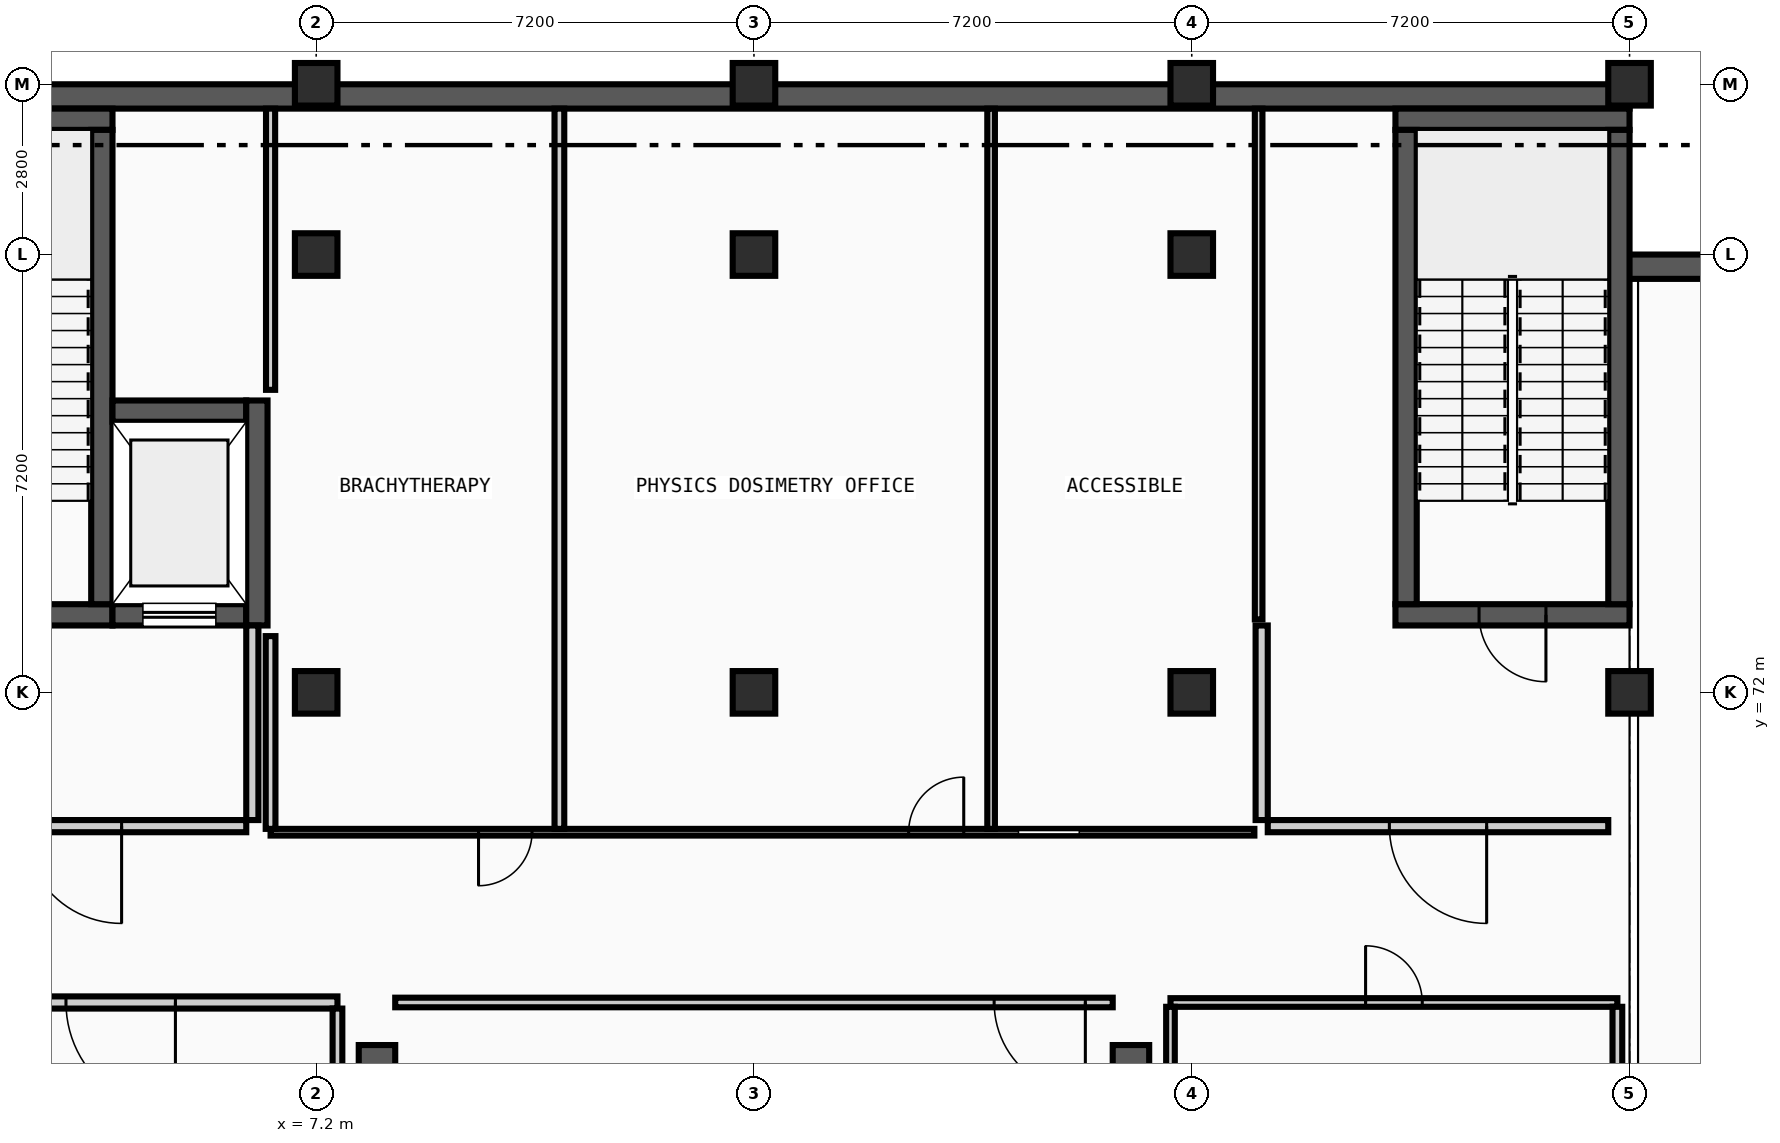
"""IFC4 building model, lengths in metres.
Left out: names, types, materials, properties, quantities, classifications, styles, units other than length and angle.
Written with IfcOpenShell. Run it as: python <this file> out.ifc"""

import sys

from ifc_helpers import new_model, si_unit, direction, frame, frame_2d, origin, origin_2d, place, context, subcontext, project, spatial, rectangle, extrude, element, fill, save


model = new_model("IFC4")
c1 = context("Model", 3, precision=1e-05, world=origin(), true_north=direction((0.0, 1.0)))
c2 = subcontext(c1, "Body", "Model", "MODEL_VIEW")
j1 = project(units=[si_unit("LENGTHUNIT", "METRE"), si_unit("PLANEANGLEUNIT", "RADIAN")], contexts=[c1])
p1 = place(None, origin())
s1 = spatial("IfcSite", under=j1, at=p1, CompositionType="ELEMENT")
p2 = place(p1, origin())
s2 = spatial("IfcBuilding", under=s1, at=p2, CompositionType="ELEMENT")
p3 = place(p2, frame((0.0, 0.0, -4.8)))
s3 = spatial("IfcBuildingStorey", under=s2, at=p3, CompositionType="ELEMENT", Elevation=-4.8)
for number, where, z_axis, x_axis in (
    (1, (7.2, 72.0, 0.0), (0.0, 0.0, 1.0), (1.0, 0.0, 0.0)),
    (2, (7.2, 79.2, 0.0), (0.0, 0.0, 1.0), (1.0, 0.0, 0.0)),
    (3, (7.2, 82.0, 0.0), (0.0, 0.0, 1.0), (1.0, 0.0, 0.0)),
    (4, (14.4, 72.0, 0.0), (0.0, 0.0, 1.0), (1.0, 0.0, 0.0)),
    (5, (14.4, 79.2, 0.0), (0.0, 0.0, 1.0), (1.0, 0.0, 0.0)),
    (6, (14.4, 82.0, 0.0), (0.0, 0.0, 1.0), (1.0, 0.0, 0.0)),
    (7, (21.6, 72.0, 0.0), (0.0, 0.0, 1.0), (1.0, 0.0, 0.0)),
    (8, (21.6, 79.2, 0.0), (0.0, 0.0, 1.0), (1.0, 0.0, 0.0)),
    (9, (21.6, 82.0, 0.0), (0.0, 0.0, 1.0), (1.0, 0.0, 0.0)),
    (10, (28.8, 72.0, 0.0), (0.0, 0.0, 1.0), (1.0, 0.0, 0.0)),
    (11, (28.8, 82.0, 0.0), (0.0, 0.0, 1.0), (1.0, 0.0, 0.0)),
):
    element("IfcColumn", number, at=place(p3, frame(where, z_axis=z_axis, x_axis=x_axis)), inside=s3, PredefinedType="COLUMN", context=c2, shape_type="SweptSolid", body=[
        extrude(rectangle(XDim=0.7, YDim=0.7, at=origin_2d()), origin(), (0.0, 0.0, 1.0), 4.8),
    ])
p4 = place(p3, frame((36.4, 79.0, 0.0), z_axis=(0.0, 0.0, 1.0), x_axis=(-1.0, 0.0, 0.0)))
e12 = element("IfcWall", 12, at=p4, inside=s3, PredefinedType="USERDEFINED", context=c2, shape_type="SweptSolid", body=[
    extrude(rectangle(XDim=8.0, YDim=0.4, at=frame_2d((4.0, 0.0))), origin(), (0.0, 0.0, 1.0), 4.545),
])
p5 = place(p3, frame((28.8, 81.8, 0.0), z_axis=(0.0, 0.0, 1.0), x_axis=(-1.0, 0.0, 0.0)))
e13 = element("IfcWall", 13, at=p5, inside=s3, PredefinedType="USERDEFINED", context=c2, shape_type="SweptSolid", body=[
    extrude(rectangle(XDim=28.8, YDim=0.4, at=frame_2d((14.4, 0.0))), origin(), (0.0, 0.0, 1.0), 4.545),
])
for number, where, z_axis, x_axis in (
    (14, (8.2, 58.6, 0.0), (0.0, 0.0, 1.0), (0.0, 1.0, 0.0)),
    (15, (20.6, 58.6, 0.0), (0.0, 0.0, 1.0), (0.0, 1.0, 0.0)),
):
    element("IfcWall", number, at=place(p3, frame(where, z_axis=z_axis, x_axis=x_axis)), inside=s3, PredefinedType="SHEAR", context=c2, shape_type="SweptSolid", body=[
        extrude(rectangle(XDim=7.6, YDim=0.6, at=frame_2d((3.8, 0.0))), origin(), (0.0, 0.0, 1.0), 4.5),
    ])
p6 = place(p3, frame((0.0, 73.275, 0.0), z_axis=(0.0, 0.0, 1.0), x_axis=(1.0, 0.0, 0.0)))
e16 = element("IfcWall", 16, at=p6, inside=s3, PredefinedType="SHEAR", context=c2, shape_type="SweptSolid", body=[
    extrude(rectangle(XDim=3.85, YDim=0.35, at=frame_2d((1.925, 0.0))), origin(), (0.0, 0.0, 1.0), 4.545),
])
p7 = place(p6, frame((1.375, 0.0, 0.0)))
e17 = element("IfcOpeningElement", 17, at=p7, cuts=e16, PredefinedType="OPENING", context=c2, shape_type="SweptSolid", body=[
    extrude(rectangle(XDim=1.1, YDim=2.15, at=frame_2d((0.55, 1.075))), frame((0.0, 0.185, 0.0), z_axis=(0.0, -1.0, 0.0), x_axis=(1.0, 0.0, 0.0)), (0.0, 0.0, 1.0), 0.37),
])
p8 = place(p3, frame((0.0, 81.425, 0.0), z_axis=(0.0, 0.0, 1.0), x_axis=(1.0, 0.0, 0.0)))
e18 = element("IfcWall", 18, at=p8, inside=s3, PredefinedType="SHEAR", context=c2, shape_type="SweptSolid", body=[
    extrude(rectangle(XDim=3.85, YDim=0.35, at=frame_2d((1.925, 0.0))), origin(), (0.0, 0.0, 1.0), 4.545),
])
p9 = place(p3, frame((3.675, 73.45, 0.0), z_axis=(0.0, 0.0, 1.0), x_axis=(0.0, 1.0, 0.0)))
e19 = element("IfcWall", 19, at=p9, inside=s3, PredefinedType="SHEAR", context=c2, shape_type="SweptSolid", body=[
    extrude(rectangle(XDim=7.8, YDim=0.35, at=frame_2d((3.9, 0.0))), origin(), (0.0, 0.0, 1.0), 4.545),
])
p10 = place(p3, frame((3.85, 73.275, 0.0), z_axis=(0.0, 0.0, 1.0), x_axis=(1.0, 0.0, 0.0)))
e20 = element("IfcWall", 20, at=p10, inside=s3, PredefinedType="SHEAR", context=c2, shape_type="SweptSolid", body=[
    extrude(rectangle(XDim=2.2, YDim=0.35, at=frame_2d((1.1, 0.0))), origin(), (0.0, 0.0, 1.0), 4.545),
])
p11 = place(p10, frame((0.5, 0.0, 0.0)))
e21 = element("IfcOpeningElement", 21, at=p11, cuts=e20, PredefinedType="OPENING", context=c2, shape_type="SweptSolid", body=[
    extrude(rectangle(XDim=1.2, YDim=2.2, at=frame_2d((0.6, 1.1))), frame((0.0, 0.185, 0.0), z_axis=(0.0, -1.0, 0.0), x_axis=(1.0, 0.0, 0.0)), (0.0, 0.0, 1.0), 0.37),
])
p12 = place(p3, frame((3.85, 76.625, 0.0), z_axis=(0.0, 0.0, 1.0), x_axis=(1.0, 0.0, 0.0)))
e22 = element("IfcWall", 22, at=p12, inside=s3, PredefinedType="SHEAR", context=c2, shape_type="SweptSolid", body=[
    extrude(rectangle(XDim=2.2, YDim=0.35, at=frame_2d((1.1, 0.0))), origin(), (0.0, 0.0, 1.0), 4.545),
])
p13 = place(p3, frame((6.225, 73.1, 0.0), z_axis=(0.0, 0.0, 1.0), x_axis=(0.0, 1.0, 0.0)))
e23 = element("IfcWall", 23, at=p13, inside=s3, PredefinedType="SHEAR", context=c2, shape_type="SweptSolid", body=[
    extrude(rectangle(XDim=3.7, YDim=0.35, at=frame_2d((1.85, 0.0))), origin(), (0.0, 0.0, 1.0), 4.545),
])
p14 = place(p3, frame((0.35, 69.8, 0.0), z_axis=(0.0, 0.0, 1.0), x_axis=(1.0, 0.0, 0.0)))
e24 = element("IfcWall", 24, at=p14, inside=s3, PredefinedType="PARTITIONING", context=c2, shape_type="SweptSolid", body=[
    extrude(rectangle(XDim=5.7, YDim=0.2, at=frame_2d((2.85, 0.0))), origin(), (0.0, 0.0, 1.0), 4.545),
])
p15 = place(p14, frame((2.05, 0.0, 0.0)))
e25 = element("IfcOpeningElement", 25, at=p15, cuts=e24, PredefinedType="OPENING", context=c2, shape_type="SweptSolid", body=[
    extrude(rectangle(XDim=1.6, YDim=2.2, at=frame_2d((0.8, 1.1))), frame((0.0, 0.11, 0.0), z_axis=(0.0, -1.0, 0.0), x_axis=(1.0, 0.0, 0.0)), (0.0, 0.0, 1.0), 0.22),
])
p16 = place(p3, frame((6.15, 69.9, 0.0), z_axis=(0.0, 0.0, 1.0), x_axis=(0.0, 1.0, 0.0)))
e26 = element("IfcWall", 26, at=p16, inside=s3, PredefinedType="PARTITIONING", context=c2, shape_type="SweptSolid", body=[
    extrude(rectangle(XDim=3.2, YDim=0.2, at=frame_2d((1.6, 0.0))), origin(), (0.0, 0.0, 1.0), 4.545),
])
p17 = place(p3, frame((24.95, 73.275, 0.0), z_axis=(0.0, 0.0, 1.0), x_axis=(1.0, 0.0, 0.0)))
e27 = element("IfcWall", 27, at=p17, inside=s3, PredefinedType="SHEAR", context=c2, shape_type="SweptSolid", body=[
    extrude(rectangle(XDim=3.85, YDim=0.35, at=frame_2d((1.925, 0.0))), origin(), (0.0, 0.0, 1.0), 4.545),
])
p18 = place(p17, frame((1.375, 0.0, 0.0)))
e28 = element("IfcOpeningElement", 28, at=p18, cuts=e27, PredefinedType="OPENING", context=c2, shape_type="SweptSolid", body=[
    extrude(rectangle(XDim=1.1, YDim=2.15, at=frame_2d((0.55, 1.075))), frame((0.0, 0.185, 0.0), z_axis=(0.0, -1.0, 0.0), x_axis=(1.0, 0.0, 0.0)), (0.0, 0.0, 1.0), 0.37),
])
p19 = place(p3, frame((24.95, 81.425, 0.0), z_axis=(0.0, 0.0, 1.0), x_axis=(1.0, 0.0, 0.0)))
e29 = element("IfcWall", 29, at=p19, inside=s3, PredefinedType="SHEAR", context=c2, shape_type="SweptSolid", body=[
    extrude(rectangle(XDim=3.85, YDim=0.35, at=frame_2d((1.925, 0.0))), origin(), (0.0, 0.0, 1.0), 4.545),
])
for number, where, z_axis, x_axis in (
    (30, (25.125, 73.45, 0.0), (0.0, 0.0, 1.0), (0.0, 1.0, 0.0)),
    (31, (28.625, 73.45, 0.0), (0.0, 0.0, 1.0), (0.0, 1.0, 0.0)),
):
    element("IfcWall", number, at=place(p3, frame(where, z_axis=z_axis, x_axis=x_axis)), inside=s3, PredefinedType="SHEAR", context=c2, shape_type="SweptSolid", body=[
        extrude(rectangle(XDim=7.8, YDim=0.35, at=frame_2d((3.9, 0.0))), origin(), (0.0, 0.0, 1.0), 4.545),
    ])
p20 = place(p3, frame((22.85, 69.8, 0.0), z_axis=(0.0, 0.0, 1.0), x_axis=(1.0, 0.0, 0.0)))
e32 = element("IfcWall", 32, at=p20, inside=s3, PredefinedType="PARTITIONING", context=c2, shape_type="SweptSolid", body=[
    extrude(rectangle(XDim=5.6, YDim=0.2, at=frame_2d((2.8, 0.0))), origin(), (0.0, 0.0, 1.0), 4.545),
])
p21 = place(p20, frame((2.0, 0.0, 0.0)))
e33 = element("IfcOpeningElement", 33, at=p21, cuts=e32, PredefinedType="OPENING", context=c2, shape_type="SweptSolid", body=[
    extrude(rectangle(XDim=1.6, YDim=2.2, at=frame_2d((0.8, 1.1))), frame((0.0, 0.11, 0.0), z_axis=(0.0, -1.0, 0.0), x_axis=(1.0, 0.0, 0.0)), (0.0, 0.0, 1.0), 0.22),
])
p22 = place(p3, frame((22.75, 69.9, 0.0), z_axis=(0.0, 0.0, 1.0), x_axis=(0.0, 1.0, 0.0)))
e34 = element("IfcWall", 34, at=p22, inside=s3, PredefinedType="PARTITIONING", context=c2, shape_type="SweptSolid", body=[
    extrude(rectangle(XDim=3.2, YDim=0.2, at=frame_2d((1.6, 0.0))), origin(), (0.0, 0.0, 1.0), 4.545),
])
p23 = place(p3, frame((0.42, 66.9, 0.0), z_axis=(0.0, 0.0, 1.0), x_axis=(1.0, 0.0, 0.0)))
e35 = element("IfcWall", 35, at=p23, inside=s3, PredefinedType="PARTITIONING", context=c2, shape_type="SweptSolid", body=[
    extrude(rectangle(XDim=7.13, YDim=0.2, at=frame_2d((3.565, 0.0))), origin(), (0.0, 0.0, 1.0), 4.545),
])
p24 = place(p23, frame((2.665, 0.0, 0.0)))
e36 = element("IfcOpeningElement", 36, at=p24, cuts=e35, PredefinedType="OPENING", context=c2, shape_type="SweptSolid", body=[
    extrude(rectangle(XDim=1.8, YDim=2.3, at=frame_2d((0.9, 1.15))), frame((0.0, 0.11, 0.0), z_axis=(0.0, -1.0, 0.0), x_axis=(1.0, 0.0, 0.0)), (0.0, 0.0, 1.0), 0.22),
])
p25 = place(p3, frame((8.5, 66.9, 0.0), z_axis=(0.0, 0.0, 1.0), x_axis=(1.0, 0.0, 0.0)))
e37 = element("IfcWall", 37, at=p25, inside=s3, PredefinedType="PARTITIONING", context=c2, shape_type="SweptSolid", body=[
    extrude(rectangle(XDim=11.8, YDim=0.158, at=frame_2d((5.9, 0.0))), origin(), (0.0, 0.0, 1.0), 4.545),
])
p26 = place(p25, frame((9.85, 0.0, 0.0)))
e38 = element("IfcOpeningElement", 38, at=p26, cuts=e37, PredefinedType="OPENING", context=c2, shape_type="SweptSolid", body=[
    extrude(rectangle(XDim=1.5, YDim=2.2, at=frame_2d((0.75, 1.1))), frame((0.0, 0.089, 0.0), z_axis=(0.0, -1.0, 0.0), x_axis=(1.0, 0.0, 0.0)), (0.0, 0.0, 1.0), 0.178),
])
p27 = place(p3, frame((21.25, 66.9, 0.0), z_axis=(0.0, 0.0, 1.0), x_axis=(1.0, 0.0, 0.0)))
e39 = element("IfcWall", 39, at=p27, inside=s3, PredefinedType="PARTITIONING", context=c2, shape_type="SweptSolid", body=[
    extrude(rectangle(XDim=7.35, YDim=0.142, at=frame_2d((3.675, 0.0))), origin(), (0.0, 0.0, 1.0), 4.545),
])
p28 = place(p27, frame((3.209, 0.0, 0.0)))
e40 = element("IfcOpeningElement", 40, at=p28, cuts=e39, PredefinedType="OPENING", context=c2, shape_type="SweptSolid", body=[
    extrude(rectangle(XDim=0.932, YDim=2.068, at=frame_2d((0.466, 1.034))), frame((0.0, 0.081, 0.0), z_axis=(0.0, -1.0, 0.0), x_axis=(1.0, 0.0, 0.0)), (0.0, 0.0, 1.0), 0.162),
])
p29 = place(p3, frame((6.45, 69.7, 0.0), z_axis=(0.0, 0.0, 1.0), x_axis=(1.0, 0.0, 0.0)))
e41 = element("IfcWall", 41, at=p29, inside=s3, PredefinedType="PARTITIONING", context=c2, shape_type="SweptSolid", body=[
    extrude(rectangle(XDim=16.18, YDim=0.11, at=frame_2d((8.09, 0.0))), origin(), (0.0, 0.0, 1.0), 4.545),
])
p30 = place(p29, frame((12.3, 0.0, 0.0)))
e42 = element("IfcOpeningElement", 42, at=p30, cuts=e41, PredefinedType="OPENING", context=c2, shape_type="SweptSolid", body=[
    extrude(rectangle(XDim=1.0, YDim=2.1, at=frame_2d((0.5, 1.05))), frame((0.0, 0.065, 0.0), z_axis=(0.0, -1.0, 0.0), x_axis=(1.0, 0.0, 0.0)), (0.0, 0.0, 1.0), 0.13),
])
p31 = place(p29, frame((3.42, 0.0, 0.0)))
e43 = element("IfcOpeningElement", 43, at=p31, cuts=e41, PredefinedType="OPENING", context=c2, shape_type="SweptSolid", body=[
    extrude(rectangle(XDim=0.88, YDim=2.068, at=frame_2d((0.44, 1.034))), frame((0.0, 0.065, 0.0), z_axis=(0.0, -1.0, 0.0), x_axis=(1.0, 0.0, 0.0)), (0.0, 0.0, 1.0), 0.13),
])
p32 = place(p29, frame((10.494, 0.0, 0.0)))
e44 = element("IfcOpeningElement", 44, at=p32, cuts=e41, PredefinedType="OPENING", context=c2, shape_type="SweptSolid", body=[
    extrude(rectangle(XDim=0.906, YDim=2.068, at=frame_2d((0.453, 1.034))), frame((0.0, 0.065, 0.0), z_axis=(0.0, -1.0, 0.0), x_axis=(1.0, 0.0, 0.0)), (0.0, 0.0, 1.0), 0.13),
])
p33 = place(p3, frame((6.45, 69.755, 0.0), z_axis=(0.0, 0.0, 1.0), x_axis=(0.0, 1.0, 0.0)))
e45 = element("IfcWall", 45, at=p33, inside=s3, PredefinedType="PARTITIONING", context=c2, shape_type="SweptSolid", body=[
    extrude(rectangle(XDim=3.17, YDim=0.16, at=frame_2d((1.585, 0.0))), origin(), (0.0, 0.0, 1.0), 4.545),
])
p34 = place(p3, frame((6.45, 76.975, 0.0), z_axis=(0.0, 0.0, 1.0), x_axis=(0.0, 1.0, 0.0)))
e46 = element("IfcWall", 46, at=p34, inside=s3, PredefinedType="PARTITIONING", context=c2, shape_type="SweptSolid", body=[
    extrude(rectangle(XDim=4.625, YDim=0.15, at=frame_2d((2.312, 0.0))), origin(), (0.0, 0.0, 1.0), 4.545),
])
p35 = place(p3, frame((7.55, 65.18, 0.0), z_axis=(0.0, 0.0, 1.0), x_axis=(0.0, 1.0, 0.0)))
e47 = element("IfcWall", 47, at=p35, inside=s3, PredefinedType="PARTITIONING", context=c2, shape_type="SweptSolid", body=[
    extrude(rectangle(XDim=1.62, YDim=0.16, at=frame_2d((0.81, 0.0))), origin(), (0.0, 0.0, 1.0), 4.545),
])
p36 = place(p3, frame((11.2, 69.755, 0.0), z_axis=(0.0, 0.0, 1.0), x_axis=(0.0, 1.0, 0.0)))
e48 = element("IfcWall", 48, at=p36, inside=s3, PredefinedType="PARTITIONING", context=c2, shape_type="SweptSolid", body=[
    extrude(rectangle(XDim=11.845, YDim=0.16, at=frame_2d((5.923, 0.0))), origin(), (0.0, 0.0, 1.0), 4.545),
])
p37 = place(p3, frame((18.3, 69.755, 0.0), z_axis=(0.0, 0.0, 1.0), x_axis=(0.0, 1.0, 0.0)))
e49 = element("IfcWall", 49, at=p37, inside=s3, PredefinedType="PARTITIONING", context=c2, shape_type="SweptSolid", body=[
    extrude(rectangle(XDim=11.845, YDim=0.125, at=frame_2d((5.923, 0.0))), origin(), (0.0, 0.0, 1.0), 4.545),
])
p38 = place(p3, frame((21.25, 65.18, 0.0), z_axis=(0.0, 0.0, 1.0), x_axis=(0.0, 1.0, 0.0)))
e50 = element("IfcWall", 50, at=p38, inside=s3, PredefinedType="PARTITIONING", context=c2, shape_type="SweptSolid", body=[
    extrude(rectangle(XDim=1.649, YDim=0.142, at=frame_2d((0.825, 0.0))), origin(), (0.0, 0.0, 1.0), 4.545),
])
p39 = place(p3, frame((22.7, 73.2, 0.0), z_axis=(0.0, 0.0, 1.0), x_axis=(0.0, 1.0, 0.0)))
e51 = element("IfcWall", 51, at=p39, inside=s3, PredefinedType="PARTITIONING", context=c2, shape_type="SweptSolid", body=[
    extrude(rectangle(XDim=8.4, YDim=0.125, at=frame_2d((4.2, 0.0))), origin(), (0.0, 0.0, 1.0), 4.545),
])
p40 = place(p3, frame((28.6, 65.18, 0.0), z_axis=(0.0, 0.0, 1.0), x_axis=(0.0, 1.0, 0.0)))
e52 = element("IfcWall", 52, at=p40, inside=s3, PredefinedType="PARTITIONING", context=c2, shape_type="SweptSolid", body=[
    extrude(rectangle(XDim=1.649, YDim=0.16, at=frame_2d((0.825, 0.0))), origin(), (0.0, 0.0, 1.0), 4.235),
])
p41 = place(p11, origin())
e53 = element("IfcDoor", 53, at=p41, inside=s3, OperationType="SLIDING_TO_RIGHT", PredefinedType="DOOR", context=c2, shape_type="SweptSolid", body=[
    extrude(rectangle(XDim=1.2, YDim=2.2, at=frame_2d((0.6, 1.1))), frame((0.0, 0.025, 0.0), z_axis=(0.0, -1.0, 0.0), x_axis=(1.0, 0.0, 0.0)), (0.0, 0.0, 1.0), 0.05),
])
fill(e21, e53)
p42 = place(p15, origin())
e54 = element("IfcDoor", 54, at=p42, inside=s3, OperationType="DOUBLE_DOOR_SINGLE_SWING", PredefinedType="DOOR", context=c2, shape_type="SweptSolid", body=[
    extrude(rectangle(XDim=1.6, YDim=2.2, at=frame_2d((0.8, 1.1))), frame((0.0, 0.025, 0.0), z_axis=(0.0, -1.0, 0.0), x_axis=(1.0, 0.0, 0.0)), (0.0, 0.0, 1.0), 0.05),
])
fill(e25, e54)
p43 = place(p18, origin())
e55 = element("IfcDoor", 55, at=p43, inside=s3, OperationType="SINGLE_SWING_RIGHT", PredefinedType="DOOR", context=c2, shape_type="SweptSolid", body=[
    extrude(rectangle(XDim=1.1, YDim=2.15, at=frame_2d((0.55, 1.075))), frame((0.0, 0.025, 0.0), z_axis=(0.0, -1.0, 0.0), x_axis=(1.0, 0.0, 0.0)), (0.0, 0.0, 1.0), 0.05),
])
fill(e28, e55)
p44 = place(p21, origin())
e56 = element("IfcDoor", 56, at=p44, inside=s3, OperationType="DOUBLE_DOOR_SINGLE_SWING", PredefinedType="DOOR", context=c2, shape_type="SweptSolid", body=[
    extrude(rectangle(XDim=1.6, YDim=2.2, at=frame_2d((0.8, 1.1))), frame((0.0, 0.025, 0.0), z_axis=(0.0, -1.0, 0.0), x_axis=(1.0, 0.0, 0.0)), (0.0, 0.0, 1.0), 0.05),
])
fill(e33, e56)
p45 = place(p26, origin())
e57 = element("IfcDoor", 57, at=p45, inside=s3, OperationType="DOUBLE_DOOR_SINGLE_SWING", PredefinedType="DOOR", context=c2, shape_type="SweptSolid", body=[
    extrude(rectangle(XDim=1.5, YDim=2.2, at=frame_2d((0.75, 1.1))), frame((0.0, 0.025, 0.0), z_axis=(0.0, -1.0, 0.0), x_axis=(1.0, 0.0, 0.0)), (0.0, 0.0, 1.0), 0.05),
])
fill(e38, e57)
p46 = place(p30, frame((1.0, 0.0, 0.0), z_axis=(0.0, 0.0, 1.0), x_axis=(-1.0, 0.0, 0.0)))
e58 = element("IfcDoor", 58, at=p46, inside=s3, OperationType="SLIDING_TO_LEFT", PredefinedType="DOOR", context=c2, shape_type="SweptSolid", body=[
    extrude(rectangle(XDim=1.0, YDim=2.1, at=frame_2d((0.5, 1.05))), frame((0.0, 0.025, 0.0), z_axis=(0.0, -1.0, 0.0), x_axis=(1.0, 0.0, 0.0)), (0.0, 0.0, 1.0), 0.05),
])
fill(e42, e58)
p47 = place(p31, frame((0.88, 0.0, 0.0), z_axis=(0.0, 0.0, 1.0), x_axis=(-1.0, 0.0, 0.0)))
e59 = element("IfcDoor", 59, at=p47, inside=s3, OperationType="SINGLE_SWING_LEFT", PredefinedType="DOOR", context=c2, shape_type="SweptSolid", body=[
    extrude(rectangle(XDim=0.88, YDim=2.068, at=frame_2d((0.44, 1.034))), frame((0.0, 0.025, 0.0), z_axis=(0.0, -1.0, 0.0), x_axis=(1.0, 0.0, 0.0)), (0.0, 0.0, 1.0), 0.05),
])
fill(e43, e59)
p48 = place(p32, frame((0.906, 0.0, 0.0), z_axis=(0.0, 0.0, 1.0), x_axis=(-1.0, 0.0, 0.0)))
e60 = element("IfcDoor", 60, at=p48, inside=s3, OperationType="SINGLE_SWING_RIGHT", PredefinedType="DOOR", context=c2, shape_type="SweptSolid", body=[
    extrude(rectangle(XDim=0.906, YDim=2.068, at=frame_2d((0.453, 1.034))), frame((0.0, 0.025, 0.0), z_axis=(0.0, -1.0, 0.0), x_axis=(1.0, 0.0, 0.0)), (0.0, 0.0, 1.0), 0.05),
])
fill(e44, e60)
p49 = place(p24, origin())
e61 = element("IfcDoor", 61, at=p49, inside=s3, OperationType="DOUBLE_DOOR_SINGLE_SWING", PredefinedType="DOOR", context=c2, shape_type="SweptSolid", body=[
    extrude(rectangle(XDim=1.8, YDim=2.3, at=frame_2d((0.9, 1.15))), frame((0.0, 0.025, 0.0), z_axis=(0.0, -1.0, 0.0), x_axis=(1.0, 0.0, 0.0)), (0.0, 0.0, 1.0), 0.05),
])
fill(e36, e61)
p50 = place(p28, origin())
e62 = element("IfcDoor", 62, at=p50, inside=s3, OperationType="SINGLE_SWING_LEFT", PredefinedType="DOOR", context=c2, shape_type="SweptSolid", body=[
    extrude(rectangle(XDim=0.932, YDim=2.068, at=frame_2d((0.466, 1.034))), frame((0.0, 0.025, 0.0), z_axis=(0.0, -1.0, 0.0), x_axis=(1.0, 0.0, 0.0)), (0.0, 0.0, 1.0), 0.05),
])
fill(e40, e62)
save(model, sys.argv[1])
